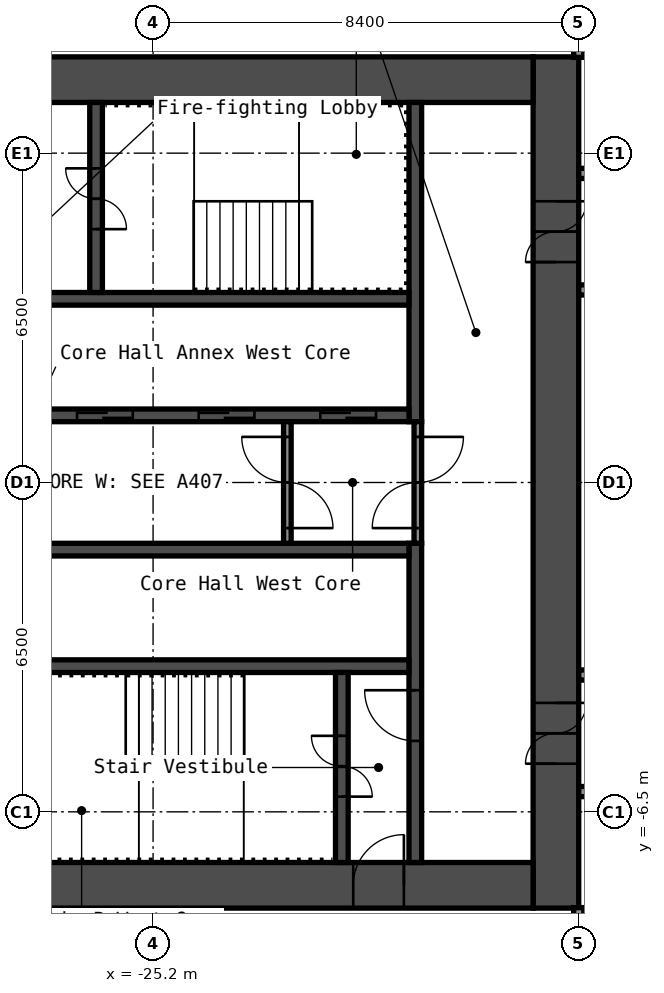
"""IFC4 building model, lengths in metres.
Left out: names, types, materials, properties, quantities, classifications, styles, units other than length and angle.
Written with IfcOpenShell. Run it as: python <this file> out.ifc"""

import sys

from ifc_helpers import new_model, si_unit, direction, frame, frame_2d, origin, place, context, subcontext, project, spatial, rectangle, extrude, element, fill, save


model = new_model("IFC4")
c1 = context("Model", 3, precision=1e-05, world=origin(), true_north=direction((0.0, 1.0)))
c2 = subcontext(c1, "Body", "Model", "MODEL_VIEW")
j1 = project(units=[si_unit("LENGTHUNIT", "METRE"), si_unit("PLANEANGLEUNIT", "RADIAN")], contexts=[c1])
p1 = place(None, origin())
s1 = spatial("IfcSite", under=j1, at=p1, CompositionType="ELEMENT")
p2 = place(p1, origin())
s2 = spatial("IfcBuilding", under=s1, at=p2, CompositionType="ELEMENT")
p3 = place(p2, frame((0.0, 0.0, 48.6)))
s3 = spatial("IfcBuildingStorey", under=s2, at=p3, CompositionType="ELEMENT", Elevation=48.6)
p4 = place(p3, frame((-17.25, -8.4, 0.0), z_axis=(0.0, 0.0, 1.0), x_axis=(0.0, 1.0, 0.0)))
e1 = element("IfcWall", 1, at=p4, inside=s3, PredefinedType="SHEAR", context=c2, shape_type="SweptSolid", body=[
    extrude(rectangle(XDim=16.8, YDim=0.9, at=frame_2d((8.4, 0.0))), origin(), (0.0, 0.0, 1.0), 2.8),
])
p5 = place(p4, frame((12.75, 0.0, 0.0)))
e2 = element("IfcOpeningElement", 2, at=p5, cuts=e1, PredefinedType="OPENING", context=c2, shape_type="SweptSolid", body=[
    extrude(rectangle(XDim=1.2, YDim=2.1, at=frame_2d((0.6, 1.05))), frame((0.0, 0.46, 0.0), z_axis=(0.0, -1.0, 0.0), x_axis=(1.0, 0.0, 0.0)), (0.0, 0.0, 1.0), 0.92),
])
p6 = place(p4, frame((2.85, 0.0, 0.0)))
e3 = element("IfcOpeningElement", 3, at=p6, cuts=e1, PredefinedType="OPENING", context=c2, shape_type="SweptSolid", body=[
    extrude(rectangle(XDim=1.2, YDim=2.1, at=frame_2d((0.6, 1.05))), frame((0.0, 0.46, 0.0), z_axis=(0.0, -1.0, 0.0), x_axis=(1.0, 0.0, 0.0)), (0.0, 0.0, 1.0), 0.92),
])
p7 = place(p3, frame((-32.7, 7.95, 0.0), z_axis=(0.0, 0.0, 1.0), x_axis=(1.0, 0.0, 0.0)))
e4 = element("IfcWall", 4, at=p7, inside=s3, PredefinedType="SHEAR", context=c2, shape_type="SweptSolid", body=[
    extrude(rectangle(XDim=15.0, YDim=0.9, at=frame_2d((7.5, 0.0))), origin(), (0.0, 0.0, 1.0), 2.8),
])
p8 = place(p7, frame((3.4, 0.0, 0.0)))
e5 = element("IfcOpeningElement", 5, at=p8, cuts=e4, PredefinedType="OPENING", context=c2, shape_type="SweptSolid", body=[
    extrude(rectangle(XDim=1.2, YDim=2.1, at=frame_2d((0.6, 1.05))), frame((0.0, 0.46, 0.0), z_axis=(0.0, -1.0, 0.0), x_axis=(1.0, 0.0, 0.0)), (0.0, 0.0, 1.0), 0.92),
])
p9 = place(p7, frame((0.75, 0.0, 0.0)))
e6 = element("IfcOpeningElement", 6, at=p9, cuts=e4, PredefinedType="OPENING", context=c2, shape_type="SweptSolid", body=[
    extrude(rectangle(XDim=0.9, YDim=2.1, at=frame_2d((0.45, 1.05))), frame((0.0, 0.46, 0.0), z_axis=(0.0, -1.0, 0.0), x_axis=(1.0, 0.0, 0.0)), (0.0, 0.0, 1.0), 0.92),
])
p10 = place(p3, frame((-32.7, -7.95, 0.0), z_axis=(0.0, 0.0, 1.0), x_axis=(1.0, 0.0, 0.0)))
e7 = element("IfcWall", 7, at=p10, inside=s3, PredefinedType="SHEAR", context=c2, shape_type="SweptSolid", body=[
    extrude(rectangle(XDim=15.0, YDim=0.9, at=frame_2d((7.5, 0.0))), origin(), (0.0, 0.0, 1.0), 2.8),
])
p11 = place(p10, frame((11.45, 0.0, 0.0)))
e8 = element("IfcOpeningElement", 8, at=p11, cuts=e7, PredefinedType="OPENING", context=c2, shape_type="SweptSolid", body=[
    extrude(rectangle(XDim=1.0, YDim=2.1, at=frame_2d((0.5, 1.05))), frame((0.0, 0.46, 0.0), z_axis=(0.0, -1.0, 0.0), x_axis=(1.0, 0.0, 0.0)), (0.0, 0.0, 1.0), 0.92),
])
p12 = place(p3, frame((-20.025, 1.2, 0.0), z_axis=(0.0, 0.0, 1.0), x_axis=(0.0, 1.0, 0.0)))
e9 = element("IfcWall", 9, at=p12, inside=s3, PredefinedType="SHEAR", context=c2, shape_type="SweptSolid", body=[
    extrude(rectangle(XDim=6.3, YDim=0.25, at=frame_2d((3.15, 0.0))), origin(), (0.0, 0.0, 1.0), 2.8),
])
p13 = place(p3, frame((-20.025, -7.5, 0.0), z_axis=(0.0, 0.0, 1.0), x_axis=(0.0, 1.0, 0.0)))
e10 = element("IfcWall", 10, at=p13, inside=s3, PredefinedType="SHEAR", context=c2, shape_type="SweptSolid", body=[
    extrude(rectangle(XDim=6.3, YDim=0.25, at=frame_2d((3.15, 0.0))), origin(), (0.0, 0.0, 1.0), 2.8),
])
p14 = place(p13, frame((2.4, 0.0, 0.0)))
e11 = element("IfcOpeningElement", 11, at=p14, cuts=e10, PredefinedType="OPENING", context=c2, shape_type="SweptSolid", body=[
    extrude(rectangle(XDim=1.0, YDim=2.1, at=frame_2d((0.5, 1.05))), frame((0.0, 0.135, 0.0), z_axis=(0.0, -1.0, 0.0), x_axis=(1.0, 0.0, 0.0)), (0.0, 0.0, 1.0), 0.27),
])
p15 = place(p3, frame((-27.65, 1.325, 0.0), z_axis=(0.0, 0.0, 1.0), x_axis=(1.0, 0.0, 0.0)))
e12 = element("IfcWall", 12, at=p15, inside=s3, PredefinedType="SHEAR", context=c2, shape_type="SweptSolid", body=[
    extrude(rectangle(XDim=7.5, YDim=0.25, at=frame_2d((3.75, 0.0))), origin(), (0.0, 0.0, 1.0), 2.8),
])
p16 = place(p15, frame((5.75, 0.0, 0.0)))
e13 = element("IfcOpeningElement", 13, at=p16, cuts=e12, PredefinedType="OPENING", context=c2, shape_type="SweptSolid", body=[
    extrude(rectangle(XDim=1.1, YDim=2.1, at=frame_2d((0.55, 1.05))), frame((0.0, 0.135, 0.0), z_axis=(0.0, -1.0, 0.0), x_axis=(1.0, 0.0, 0.0)), (0.0, 0.0, 1.0), 0.27),
])
p17 = place(p15, frame((3.35, 0.0, 0.0)))
e14 = element("IfcOpeningElement", 14, at=p17, cuts=e12, PredefinedType="OPENING", context=c2, shape_type="SweptSolid", body=[
    extrude(rectangle(XDim=1.1, YDim=2.1, at=frame_2d((0.55, 1.05))), frame((0.0, 0.135, 0.0), z_axis=(0.0, -1.0, 0.0), x_axis=(1.0, 0.0, 0.0)), (0.0, 0.0, 1.0), 0.27),
])
p18 = place(p15, frame((0.95, 0.0, 0.0)))
e15 = element("IfcOpeningElement", 15, at=p18, cuts=e12, PredefinedType="OPENING", context=c2, shape_type="SweptSolid", body=[
    extrude(rectangle(XDim=1.1, YDim=2.1, at=frame_2d((0.55, 1.05))), frame((0.0, 0.135, 0.0), z_axis=(0.0, -1.0, 0.0), x_axis=(1.0, 0.0, 0.0)), (0.0, 0.0, 1.0), 0.27),
])
p19 = place(p3, frame((-27.65, 3.625, 0.0), z_axis=(0.0, 0.0, 1.0), x_axis=(1.0, 0.0, 0.0)))
e16 = element("IfcWall", 16, at=p19, inside=s3, PredefinedType="SHEAR", context=c2, shape_type="SweptSolid", body=[
    extrude(rectangle(XDim=7.5, YDim=0.25, at=frame_2d((3.75, 0.0))), origin(), (0.0, 0.0, 1.0), 2.8),
])
p20 = place(p3, frame((-26.325, 3.75, 0.0), z_axis=(0.0, 0.0, 1.0), x_axis=(0.0, 1.0, 0.0)))
e17 = element("IfcWall", 17, at=p20, inside=s3, PredefinedType="SHEAR", context=c2, shape_type="SweptSolid", body=[
    extrude(rectangle(XDim=3.75, YDim=0.25, at=frame_2d((1.875, 0.0))), origin(), (0.0, 0.0, 1.0), 2.8),
])
p21 = place(p20, frame((1.25, 0.0, 0.0)))
e18 = element("IfcOpeningElement", 18, at=p21, cuts=e17, PredefinedType="OPENING", context=c2, shape_type="SweptSolid", body=[
    extrude(rectangle(XDim=1.2, YDim=2.1, at=frame_2d((0.6, 1.05))), frame((0.0, 0.135, 0.0), z_axis=(0.0, -1.0, 0.0), x_axis=(1.0, 0.0, 0.0)), (0.0, 0.0, 1.0), 0.27),
])
for number, where, z_axis, x_axis in (
    (19, (-27.65, -1.325, 0.0), (0.0, 0.0, 1.0), (1.0, 0.0, 0.0)),
    (20, (-27.65, -3.625, 0.0), (0.0, 0.0, 1.0), (1.0, 0.0, 0.0)),
):
    element("IfcWall", number, at=place(p3, frame(where, z_axis=z_axis, x_axis=x_axis)), inside=s3, PredefinedType="SHEAR", context=c2, shape_type="SweptSolid", body=[
        extrude(rectangle(XDim=7.5, YDim=0.25, at=frame_2d((3.75, 0.0))), origin(), (0.0, 0.0, 1.0), 2.8),
    ])
p22 = place(p3, frame((-21.475, -7.5, 0.0), z_axis=(0.0, 0.0, 1.0), x_axis=(0.0, 1.0, 0.0)))
e21 = element("IfcWall", 21, at=p22, inside=s3, PredefinedType="SHEAR", context=c2, shape_type="SweptSolid", body=[
    extrude(rectangle(XDim=3.75, YDim=0.25, at=frame_2d((1.875, 0.0))), origin(), (0.0, 0.0, 1.0), 2.8),
])
p23 = place(p22, frame((1.3, 0.0, 0.0)))
e22 = element("IfcOpeningElement", 22, at=p23, cuts=e21, PredefinedType="OPENING", context=c2, shape_type="SweptSolid", body=[
    extrude(rectangle(XDim=1.2, YDim=2.1, at=frame_2d((0.6, 1.05))), frame((0.0, 0.135, 0.0), z_axis=(0.0, -1.0, 0.0), x_axis=(1.0, 0.0, 0.0)), (0.0, 0.0, 1.0), 0.27),
])
p24 = place(p3, frame((-19.975, -1.2, 0.0), z_axis=(0.0, 0.0, 1.0), x_axis=(0.0, 1.0, 0.0)))
e23 = element("IfcWall", 23, at=p24, inside=s3, PredefinedType="PARTITIONING", context=c2, shape_type="SweptSolid", body=[
    extrude(rectangle(XDim=2.4, YDim=0.15, at=frame_2d((1.2, 0.0))), origin(), (0.0, 0.0, 1.0), 2.8),
])
p25 = place(p24, frame((0.3, 0.0, 0.0)))
e24 = element("IfcOpeningElement", 24, at=p25, cuts=e23, PredefinedType="OPENING", context=c2, shape_type="SweptSolid", body=[
    extrude(rectangle(XDim=1.8, YDim=2.1, at=frame_2d((0.9, 1.05))), frame((0.0, 0.085, 0.0), z_axis=(0.0, -1.0, 0.0), x_axis=(1.0, 0.0, 0.0)), (0.0, 0.0, 1.0), 0.17),
])
p26 = place(p3, frame((-22.55, -1.2, 0.0), z_axis=(0.0, 0.0, 1.0), x_axis=(0.0, 1.0, 0.0)))
e25 = element("IfcWall", 25, at=p26, inside=s3, PredefinedType="PARTITIONING", context=c2, shape_type="SweptSolid", body=[
    extrude(rectangle(XDim=2.4, YDim=0.15, at=frame_2d((1.2, 0.0))), origin(), (0.0, 0.0, 1.0), 2.8),
])
p27 = place(p26, frame((0.3, 0.0, 0.0)))
e26 = element("IfcOpeningElement", 26, at=p27, cuts=e25, PredefinedType="OPENING", context=c2, shape_type="SweptSolid", body=[
    extrude(rectangle(XDim=1.8, YDim=2.1, at=frame_2d((0.9, 1.05))), frame((0.0, 0.085, 0.0), z_axis=(0.0, -1.0, 0.0), x_axis=(1.0, 0.0, 0.0)), (0.0, 0.0, 1.0), 0.17),
])
p28 = place(p3, frame((-16.8, -6.1, 0.0), z_axis=(0.0, 0.0, 1.0), x_axis=(1.0, 0.0, 0.0)))
e27 = element("IfcWall", 27, at=p28, inside=s3, PredefinedType="PARTITIONING", context=c2, shape_type="SweptSolid", body=[
    extrude(rectangle(XDim=33.6, YDim=0.2, at=frame_2d((16.8, 0.0))), origin(), (0.0, 0.0, 1.0), 2.8),
])
p29 = place(p28, frame((5.8, 0.0, 0.0)))
e28 = element("IfcOpeningElement", 28, at=p29, cuts=e27, PredefinedType="OPENING", context=c2, shape_type="SweptSolid", body=[
    extrude(rectangle(XDim=1.0, YDim=2.1, at=frame_2d((0.5, 1.05))), frame((0.0, 0.11, 0.0), z_axis=(0.0, -1.0, 0.0), x_axis=(1.0, 0.0, 0.0)), (0.0, 0.0, 1.0), 0.22),
])
p30 = place(p28, frame((10.0, 0.0, 0.0)))
e29 = element("IfcOpeningElement", 29, at=p30, cuts=e27, PredefinedType="OPENING", context=c2, shape_type="SweptSolid", body=[
    extrude(rectangle(XDim=1.0, YDim=2.1, at=frame_2d((0.5, 1.05))), frame((0.0, 0.11, 0.0), z_axis=(0.0, -1.0, 0.0), x_axis=(1.0, 0.0, 0.0)), (0.0, 0.0, 1.0), 0.22),
])
p31 = place(p28, frame((22.6, 0.0, 0.0)))
e30 = element("IfcOpeningElement", 30, at=p31, cuts=e27, PredefinedType="OPENING", context=c2, shape_type="SweptSolid", body=[
    extrude(rectangle(XDim=1.0, YDim=2.1, at=frame_2d((0.5, 1.05))), frame((0.0, 0.11, 0.0), z_axis=(0.0, -1.0, 0.0), x_axis=(1.0, 0.0, 0.0)), (0.0, 0.0, 1.0), 0.22),
])
p32 = place(p28, frame((31.0, 0.0, 0.0)))
e31 = element("IfcOpeningElement", 31, at=p32, cuts=e27, PredefinedType="OPENING", context=c2, shape_type="SweptSolid", body=[
    extrude(rectangle(XDim=1.0, YDim=2.1, at=frame_2d((0.5, 1.05))), frame((0.0, 0.11, 0.0), z_axis=(0.0, -1.0, 0.0), x_axis=(1.0, 0.0, 0.0)), (0.0, 0.0, 1.0), 0.22),
])
p33 = place(p3, frame((-16.8, -3.8, 0.0), z_axis=(0.0, 0.0, 1.0), x_axis=(1.0, 0.0, 0.0)))
e32 = element("IfcWall", 32, at=p33, inside=s3, PredefinedType="PARTITIONING", context=c2, shape_type="SweptSolid", body=[
    extrude(rectangle(XDim=33.6, YDim=0.2, at=frame_2d((16.8, 0.0))), origin(), (0.0, 0.0, 1.0), 2.8),
])
p34 = place(p33, frame((10.47, 0.0, 0.0)))
e33 = element("IfcOpeningElement", 33, at=p34, cuts=e32, PredefinedType="OPENING", context=c2, shape_type="SweptSolid", body=[
    extrude(rectangle(XDim=0.9, YDim=2.1, at=frame_2d((0.45, 1.05))), frame((0.0, 0.11, 0.0), z_axis=(0.0, -1.0, 0.0), x_axis=(1.0, 0.0, 0.0)), (0.0, 0.0, 1.0), 0.22),
])
p35 = place(p33, frame((14.67, 0.0, 0.0)))
e34 = element("IfcOpeningElement", 34, at=p35, cuts=e32, PredefinedType="OPENING", context=c2, shape_type="SweptSolid", body=[
    extrude(rectangle(XDim=0.9, YDim=2.1, at=frame_2d((0.45, 1.05))), frame((0.0, 0.11, 0.0), z_axis=(0.0, -1.0, 0.0), x_axis=(1.0, 0.0, 0.0)), (0.0, 0.0, 1.0), 0.22),
])
p36 = place(p33, frame((26.26, 0.0, 0.0)))
e35 = element("IfcOpeningElement", 35, at=p36, cuts=e32, PredefinedType="OPENING", context=c2, shape_type="SweptSolid", body=[
    extrude(rectangle(XDim=0.9, YDim=2.1, at=frame_2d((0.45, 1.05))), frame((0.0, 0.11, 0.0), z_axis=(0.0, -1.0, 0.0), x_axis=(1.0, 0.0, 0.0)), (0.0, 0.0, 1.0), 0.22),
])
p37 = place(p33, frame((30.46, 0.0, 0.0)))
e36 = element("IfcOpeningElement", 36, at=p37, cuts=e32, PredefinedType="OPENING", context=c2, shape_type="SweptSolid", body=[
    extrude(rectangle(XDim=0.9, YDim=2.1, at=frame_2d((0.45, 1.05))), frame((0.0, 0.11, 0.0), z_axis=(0.0, -1.0, 0.0), x_axis=(1.0, 0.0, 0.0)), (0.0, 0.0, 1.0), 0.22),
])
p38 = place(p3, frame((-16.8, 3.8, 0.0), z_axis=(0.0, 0.0, 1.0), x_axis=(1.0, 0.0, 0.0)))
e37 = element("IfcWall", 37, at=p38, inside=s3, PredefinedType="PARTITIONING", context=c2, shape_type="SweptSolid", body=[
    extrude(rectangle(XDim=33.6, YDim=0.2, at=frame_2d((16.8, 0.0))), origin(), (0.0, 0.0, 1.0), 2.8),
])
p39 = place(p38, frame((1.315, 0.0, 0.0)))
e38 = element("IfcOpeningElement", 38, at=p39, cuts=e37, PredefinedType="OPENING", context=c2, shape_type="SweptSolid", body=[
    extrude(rectangle(XDim=0.9, YDim=2.1, at=frame_2d((0.45, 1.05))), frame((0.0, 0.11, 0.0), z_axis=(0.0, -1.0, 0.0), x_axis=(1.0, 0.0, 0.0)), (0.0, 0.0, 1.0), 0.22),
])
p40 = place(p38, frame((5.515, 0.0, 0.0)))
e39 = element("IfcOpeningElement", 39, at=p40, cuts=e37, PredefinedType="OPENING", context=c2, shape_type="SweptSolid", body=[
    extrude(rectangle(XDim=0.9, YDim=2.1, at=frame_2d((0.45, 1.05))), frame((0.0, 0.11, 0.0), z_axis=(0.0, -1.0, 0.0), x_axis=(1.0, 0.0, 0.0)), (0.0, 0.0, 1.0), 0.22),
])
p41 = place(p38, frame((18.03, 0.0, 0.0)))
e40 = element("IfcOpeningElement", 40, at=p41, cuts=e37, PredefinedType="OPENING", context=c2, shape_type="SweptSolid", body=[
    extrude(rectangle(XDim=0.9, YDim=2.1, at=frame_2d((0.45, 1.05))), frame((0.0, 0.11, 0.0), z_axis=(0.0, -1.0, 0.0), x_axis=(1.0, 0.0, 0.0)), (0.0, 0.0, 1.0), 0.22),
])
p42 = place(p38, frame((22.23, 0.0, 0.0)))
e41 = element("IfcOpeningElement", 41, at=p42, cuts=e37, PredefinedType="OPENING", context=c2, shape_type="SweptSolid", body=[
    extrude(rectangle(XDim=0.9, YDim=2.1, at=frame_2d((0.45, 1.05))), frame((0.0, 0.11, 0.0), z_axis=(0.0, -1.0, 0.0), x_axis=(1.0, 0.0, 0.0)), (0.0, 0.0, 1.0), 0.22),
])
p43 = place(p3, frame((-16.8, 6.1, 0.0), z_axis=(0.0, 0.0, 1.0), x_axis=(1.0, 0.0, 0.0)))
e42 = element("IfcWall", 42, at=p43, inside=s3, PredefinedType="PARTITIONING", context=c2, shape_type="SweptSolid", body=[
    extrude(rectangle(XDim=33.6, YDim=0.2, at=frame_2d((16.8, 0.0))), origin(), (0.0, 0.0, 1.0), 2.8),
])
p44 = place(p43, frame((1.6, 0.0, 0.0)))
e43 = element("IfcOpeningElement", 43, at=p44, cuts=e42, PredefinedType="OPENING", context=c2, shape_type="SweptSolid", body=[
    extrude(rectangle(XDim=1.0, YDim=2.1, at=frame_2d((0.5, 1.05))), frame((0.0, 0.11, 0.0), z_axis=(0.0, -1.0, 0.0), x_axis=(1.0, 0.0, 0.0)), (0.0, 0.0, 1.0), 0.22),
])
p45 = place(p43, frame((10.0, 0.0, 0.0)))
e44 = element("IfcOpeningElement", 44, at=p45, cuts=e42, PredefinedType="OPENING", context=c2, shape_type="SweptSolid", body=[
    extrude(rectangle(XDim=1.0, YDim=2.1, at=frame_2d((0.5, 1.05))), frame((0.0, 0.11, 0.0), z_axis=(0.0, -1.0, 0.0), x_axis=(1.0, 0.0, 0.0)), (0.0, 0.0, 1.0), 0.22),
])
p46 = place(p43, frame((18.4, 0.0, 0.0)))
e45 = element("IfcOpeningElement", 45, at=p46, cuts=e42, PredefinedType="OPENING", context=c2, shape_type="SweptSolid", body=[
    extrude(rectangle(XDim=1.0, YDim=2.1, at=frame_2d((0.5, 1.05))), frame((0.0, 0.11, 0.0), z_axis=(0.0, -1.0, 0.0), x_axis=(1.0, 0.0, 0.0)), (0.0, 0.0, 1.0), 0.22),
])
p47 = place(p43, frame((26.8, 0.0, 0.0)))
e46 = element("IfcOpeningElement", 46, at=p47, cuts=e42, PredefinedType="OPENING", context=c2, shape_type="SweptSolid", body=[
    extrude(rectangle(XDim=1.0, YDim=2.1, at=frame_2d((0.5, 1.05))), frame((0.0, 0.11, 0.0), z_axis=(0.0, -1.0, 0.0), x_axis=(1.0, 0.0, 0.0)), (0.0, 0.0, 1.0), 0.22),
])
for number, where, z_axis, x_axis in (
    (47, (-16.8, -20.3, 0.0), (0.0, 0.0, 1.0), (0.0, 1.0, 0.0)),
    (48, (-16.8, 8.39, 0.0), (0.0, 0.0, 1.0), (0.0, 1.0, 0.0)),
):
    element("IfcWall", number, at=place(p3, frame(where, z_axis=z_axis, x_axis=x_axis)), inside=s3, PredefinedType="PARTITIONING", context=c2, shape_type="SweptSolid", body=[
        extrude(rectangle(XDim=11.91, YDim=0.2, at=frame_2d((5.955, 0.0))), origin(), (0.0, 0.0, 1.0), 2.8),
    ])
p48 = place(p5, origin())
e49 = element("IfcDoor", 49, at=p48, inside=s3, OperationType="DOUBLE_DOOR_SINGLE_SWING", PredefinedType="DOOR", context=c2, shape_type="SweptSolid", body=[
    extrude(rectangle(XDim=1.2, YDim=2.1, at=frame_2d((0.6, 1.05))), frame((0.0, 0.025, 0.0), z_axis=(0.0, -1.0, 0.0), x_axis=(1.0, 0.0, 0.0)), (0.0, 0.0, 1.0), 0.05),
])
fill(e2, e49)
p49 = place(p6, origin())
e50 = element("IfcDoor", 50, at=p49, inside=s3, OperationType="DOUBLE_DOOR_SINGLE_SWING", PredefinedType="DOOR", context=c2, shape_type="SweptSolid", body=[
    extrude(rectangle(XDim=1.2, YDim=2.1, at=frame_2d((0.6, 1.05))), frame((0.0, 0.025, 0.0), z_axis=(0.0, -1.0, 0.0), x_axis=(1.0, 0.0, 0.0)), (0.0, 0.0, 1.0), 0.05),
])
fill(e3, e50)
p50 = place(p11, origin())
e51 = element("IfcDoor", 51, at=p50, inside=s3, OperationType="SINGLE_SWING_LEFT", PredefinedType="DOOR", context=c2, shape_type="SweptSolid", body=[
    extrude(rectangle(XDim=1.0, YDim=2.1, at=frame_2d((0.5, 1.05))), frame((0.0, 0.025, 0.0), z_axis=(0.0, -1.0, 0.0), x_axis=(1.0, 0.0, 0.0)), (0.0, 0.0, 1.0), 0.05),
])
fill(e8, e51)
p51 = place(p21, origin())
e52 = element("IfcDoor", 52, at=p51, inside=s3, OperationType="DOUBLE_DOOR_SINGLE_SWING", PredefinedType="DOOR", context=c2, shape_type="SweptSolid", body=[
    extrude(rectangle(XDim=1.2, YDim=2.1, at=frame_2d((0.6, 1.05))), frame((0.0, 0.025, 0.0), z_axis=(0.0, -1.0, 0.0), x_axis=(1.0, 0.0, 0.0)), (0.0, 0.0, 1.0), 0.05),
])
fill(e18, e52)
p52 = place(p23, origin())
e53 = element("IfcDoor", 53, at=p52, inside=s3, OperationType="DOUBLE_DOOR_SINGLE_SWING", PredefinedType="DOOR", context=c2, shape_type="SweptSolid", body=[
    extrude(rectangle(XDim=1.2, YDim=2.1, at=frame_2d((0.6, 1.05))), frame((0.0, 0.025, 0.0), z_axis=(0.0, -1.0, 0.0), x_axis=(1.0, 0.0, 0.0)), (0.0, 0.0, 1.0), 0.05),
])
fill(e22, e53)
p53 = place(p14, origin())
e54 = element("IfcDoor", 54, at=p53, inside=s3, OperationType="SINGLE_SWING_LEFT", PredefinedType="DOOR", context=c2, shape_type="SweptSolid", body=[
    extrude(rectangle(XDim=1.0, YDim=2.1, at=frame_2d((0.5, 1.05))), frame((0.0, 0.025, 0.0), z_axis=(0.0, -1.0, 0.0), x_axis=(1.0, 0.0, 0.0)), (0.0, 0.0, 1.0), 0.05),
])
fill(e11, e54)
p54 = place(p25, origin())
e55 = element("IfcDoor", 55, at=p54, inside=s3, OperationType="DOUBLE_DOOR_SINGLE_SWING", PredefinedType="DOOR", context=c2, shape_type="SweptSolid", body=[
    extrude(rectangle(XDim=1.8, YDim=2.1, at=frame_2d((0.9, 1.05))), frame((0.0, 0.025, 0.0), z_axis=(0.0, -1.0, 0.0), x_axis=(1.0, 0.0, 0.0)), (0.0, 0.0, 1.0), 0.05),
])
fill(e24, e55)
p55 = place(p27, origin())
e56 = element("IfcDoor", 56, at=p55, inside=s3, OperationType="DOUBLE_DOOR_SINGLE_SWING", PredefinedType="DOOR", context=c2, shape_type="SweptSolid", body=[
    extrude(rectangle(XDim=1.8, YDim=2.1, at=frame_2d((0.9, 1.05))), frame((0.0, 0.025, 0.0), z_axis=(0.0, -1.0, 0.0), x_axis=(1.0, 0.0, 0.0)), (0.0, 0.0, 1.0), 0.05),
])
fill(e26, e56)
p56 = place(p16, origin())
e57 = element("IfcDoor", 57, at=p56, inside=s3, OperationType="DOUBLE_DOOR_SLIDING", PredefinedType="DOOR", context=c2, shape_type="SweptSolid", body=[
    extrude(rectangle(XDim=1.1, YDim=2.1, at=frame_2d((0.55, 1.05))), frame((0.0, 0.025, 0.0), z_axis=(0.0, -1.0, 0.0), x_axis=(1.0, 0.0, 0.0)), (0.0, 0.0, 1.0), 0.05),
])
fill(e13, e57)
p57 = place(p17, origin())
e58 = element("IfcDoor", 58, at=p57, inside=s3, OperationType="DOUBLE_DOOR_SLIDING", PredefinedType="DOOR", context=c2, shape_type="SweptSolid", body=[
    extrude(rectangle(XDim=1.1, YDim=2.1, at=frame_2d((0.55, 1.05))), frame((0.0, 0.025, 0.0), z_axis=(0.0, -1.0, 0.0), x_axis=(1.0, 0.0, 0.0)), (0.0, 0.0, 1.0), 0.05),
])
fill(e14, e58)
p58 = place(p18, origin())
e59 = element("IfcDoor", 59, at=p58, inside=s3, OperationType="DOUBLE_DOOR_SLIDING", PredefinedType="DOOR", context=c2, shape_type="SweptSolid", body=[
    extrude(rectangle(XDim=1.1, YDim=2.1, at=frame_2d((0.55, 1.05))), frame((0.0, 0.025, 0.0), z_axis=(0.0, -1.0, 0.0), x_axis=(1.0, 0.0, 0.0)), (0.0, 0.0, 1.0), 0.05),
])
fill(e15, e59)
save(model, sys.argv[1])
